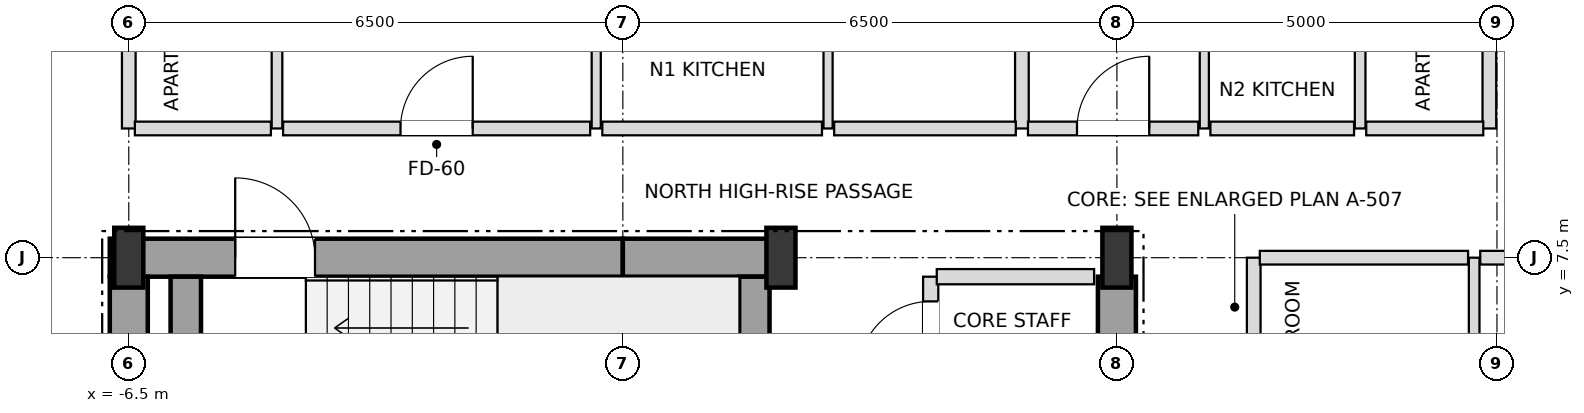
"""IFC4 building model, lengths in metres.
Left out: names, types, materials, properties, quantities, classifications, styles, units other than length and angle.
Written with IfcOpenShell. Run it as: python <this file> out.ifc"""

import sys

from ifc_helpers import new_model, si_unit, direction, frame, frame_2d, origin, origin_2d, place, context, subcontext, project, spatial, rectangle, i_section, extrude, element, fill, save


model = new_model("IFC4")
c1 = context("Model", 3, precision=1e-05, world=origin(), true_north=direction((0.0, 1.0)))
c2 = subcontext(c1, "Body", "Model", "MODEL_VIEW")
j1 = project(units=[si_unit("LENGTHUNIT", "METRE"), si_unit("PLANEANGLEUNIT", "RADIAN")], contexts=[c1])
p1 = place(None, origin())
s1 = spatial("IfcSite", under=j1, at=p1, CompositionType="ELEMENT")
p2 = place(p1, origin())
s2 = spatial("IfcBuilding", under=s1, at=p2, CompositionType="ELEMENT")
p3 = place(p2, frame((0.0, 0.0, 225.9)))
s3 = spatial("IfcBuildingStorey", under=s2, at=p3, CompositionType="ELEMENT", Elevation=225.9)
for number, where, z_axis, x_axis in (
    (1, (-6.5, 7.5, 0.0), (0.0, 0.0, 1.0), (1.0, 0.0, 0.0)),
    (2, (2.08, 7.5, 0.0), (0.0, 0.0, 1.0), (1.0, 0.0, 0.0)),
    (3, (6.5, 7.5, 0.0), (0.0, 0.0, 1.0), (1.0, 0.0, 0.0)),
):
    element("IfcColumn", number, at=place(p3, frame(where, z_axis=z_axis, x_axis=x_axis)), inside=s3, PredefinedType="COLUMN", context=c2, shape_type="SweptSolid", body=[
        extrude(i_section(OverallWidth=0.382, OverallDepth=0.786, WebThickness=0.02, FlangeThickness=0.033, at=origin_2d()), origin(), (0.0, 0.0, 1.0), 3.6),
    ])
p4 = place(p3, frame((-6.75, 7.5, 0.0), z_axis=(0.0, 0.0, 1.0), x_axis=(1.0, 0.0, 0.0)))
e4 = element("IfcWall", 4, at=p4, inside=s3, PredefinedType="SHEAR", context=c2, shape_type="SweptSolid", body=[
    extrude(rectangle(XDim=6.75, YDim=0.5, at=frame_2d((3.375, 0.0))), origin(), (0.0, 0.0, 1.0), 3.38),
])
p5 = place(p4, frame((1.65, 0.0, 0.0)))
e5 = element("IfcOpeningElement", 5, at=p5, cuts=e4, PredefinedType="OPENING", context=c2, shape_type="SweptSolid", body=[
    extrude(rectangle(XDim=1.05, YDim=2.15, at=frame_2d((0.525, 1.075))), frame((0.0, 0.26, 0.0), z_axis=(0.0, -1.0, 0.0), x_axis=(1.0, 0.0, 0.0)), (0.0, 0.0, 1.0), 0.52),
])
p6 = place(p3, frame((0.0, 7.5, 0.0), z_axis=(0.0, 0.0, 1.0), x_axis=(1.0, 0.0, 0.0)))
e6 = element("IfcWall", 6, at=p6, inside=s3, PredefinedType="SHEAR", context=c2, shape_type="SweptSolid", body=[
    extrude(rectangle(XDim=2.08, YDim=0.5, at=frame_2d((1.04, 0.0))), origin(), (0.0, 0.0, 1.0), 3.38),
])
for number, where, z_axis, x_axis in (
    (7, (-6.5, 3.95, 0.0), (0.0, 0.0, 1.0), (0.0, 1.0, 0.0)),
    (8, (6.5, 3.95, 0.0), (0.0, 0.0, 1.0), (0.0, 1.0, 0.0)),
):
    element("IfcWall", number, at=place(p3, frame(where, z_axis=z_axis, x_axis=x_axis)), inside=s3, PredefinedType="SHEAR", context=c2, shape_type="SweptSolid", body=[
        extrude(rectangle(XDim=3.3, YDim=0.5, at=frame_2d((1.65, 0.0))), origin(), (0.0, 0.0, 1.0), 3.38),
    ])
for number, where, z_axis, x_axis in (
    (9, (1.73, 3.95, 0.0), (0.0, 0.0, 1.0), (0.0, 1.0, 0.0)),
    (10, (-5.75, 3.95, 0.0), (0.0, 0.0, 1.0), (0.0, 1.0, 0.0)),
):
    element("IfcWall", number, at=place(p3, frame(where, z_axis=z_axis, x_axis=x_axis)), inside=s3, PredefinedType="SHEAR", context=c2, shape_type="SweptSolid", body=[
        extrude(rectangle(XDim=3.3, YDim=0.4, at=frame_2d((1.65, 0.0))), origin(), (0.0, 0.0, 1.0), 3.38),
    ])
p7 = place(p3, frame((-6.5, 9.2, 0.0), z_axis=(0.0, 0.0, 1.0), x_axis=(0.0, 1.0, 0.0)))
e11 = element("IfcWall", 11, at=p7, inside=s3, PredefinedType="PARTITIONING", context=c2, shape_type="SweptSolid", body=[
    extrude(rectangle(XDim=10.7, YDim=0.18, at=frame_2d((5.35, 0.0))), origin(), (0.0, 0.0, 1.0), 2.826),
])
p8 = place(p3, frame((-4.55, 9.2, 0.0), z_axis=(0.0, 0.0, 1.0), x_axis=(0.0, 1.0, 0.0)))
e12 = element("IfcWall", 12, at=p8, inside=s3, PredefinedType="PARTITIONING", context=c2, shape_type="SweptSolid", body=[
    extrude(rectangle(XDim=4.7, YDim=0.14, at=frame_2d((2.35, 0.0))), origin(), (0.0, 0.0, 1.0), 3.38),
])
p9 = place(p8, frame((1.9, 0.0, 0.0)))
e13 = element("IfcOpeningElement", 13, at=p9, cuts=e12, PredefinedType="OPENING", context=c2, shape_type="SweptSolid", body=[
    extrude(rectangle(XDim=0.9, YDim=2.1, at=frame_2d((0.45, 1.05))), frame((0.0, 0.08, 0.0), z_axis=(0.0, -1.0, 0.0), x_axis=(1.0, 0.0, 0.0)), (0.0, 0.0, 1.0), 0.16),
])
p10 = place(p3, frame((-0.35, 9.2, 0.0), z_axis=(0.0, 0.0, 1.0), x_axis=(0.0, 1.0, 0.0)))
e14 = element("IfcWall", 14, at=p10, inside=s3, PredefinedType="PARTITIONING", context=c2, shape_type="SweptSolid", body=[
    extrude(rectangle(XDim=4.7, YDim=0.12, at=frame_2d((2.35, 0.0))), origin(), (0.0, 0.0, 1.0), 3.38),
])
p11 = place(p10, frame((1.875, 0.0, 0.0)))
e15 = element("IfcOpeningElement", 15, at=p11, cuts=e14, PredefinedType="OPENING", context=c2, shape_type="SweptSolid", body=[
    extrude(rectangle(XDim=0.95, YDim=2.1, at=frame_2d((0.475, 1.05))), frame((0.0, 0.07, 0.0), z_axis=(0.0, -1.0, 0.0), x_axis=(1.0, 0.0, 0.0)), (0.0, 0.0, 1.0), 0.14),
])
p12 = place(p3, frame((2.7, 9.2, 0.0), z_axis=(0.0, 0.0, 1.0), x_axis=(0.0, 1.0, 0.0)))
e16 = element("IfcWall", 16, at=p12, inside=s3, PredefinedType="PARTITIONING", context=c2, shape_type="SweptSolid", body=[
    extrude(rectangle(XDim=4.7, YDim=0.12, at=frame_2d((2.35, 0.0))), origin(), (0.0, 0.0, 1.0), 3.38),
])
p13 = place(p12, frame((1.9, 0.0, 0.0)))
e17 = element("IfcOpeningElement", 17, at=p13, cuts=e16, PredefinedType="OPENING", context=c2, shape_type="SweptSolid", body=[
    extrude(rectangle(XDim=0.9, YDim=2.1, at=frame_2d((0.45, 1.05))), frame((0.0, 0.07, 0.0), z_axis=(0.0, -1.0, 0.0), x_axis=(1.0, 0.0, 0.0)), (0.0, 0.0, 1.0), 0.14),
])
p14 = place(p3, frame((4.05, 4.2, 0.0), z_axis=(0.0, 0.0, 1.0), x_axis=(0.0, 1.0, 0.0)))
e18 = element("IfcWall", 18, at=p14, inside=s3, PredefinedType="SOLIDWALL", context=c2, shape_type="SweptSolid", body=[
    extrude(rectangle(XDim=3.05, YDim=0.2, at=frame_2d((1.525, 0.0))), origin(), (0.0, 0.0, 1.0), 3.38),
])
p15 = place(p14, frame((0.275, 0.0, 0.0)))
e19 = element("IfcOpeningElement", 19, at=p15, cuts=e18, PredefinedType="OPENING", context=c2, shape_type="SweptSolid", body=[
    extrude(rectangle(XDim=0.95, YDim=2.15, at=frame_2d((0.475, 1.075))), frame((0.0, 0.11, 0.0), z_axis=(0.0, -1.0, 0.0), x_axis=(1.0, 0.0, 0.0)), (0.0, 0.0, 1.0), 0.22),
])
p16 = place(p14, frame((1.775, 0.0, 0.0)))
e20 = element("IfcOpeningElement", 20, at=p16, cuts=e18, PredefinedType="OPENING", context=c2, shape_type="SweptSolid", body=[
    extrude(rectangle(XDim=0.95, YDim=2.15, at=frame_2d((0.475, 1.075))), frame((0.0, 0.11, 0.0), z_axis=(0.0, -1.0, 0.0), x_axis=(1.0, 0.0, 0.0)), (0.0, 0.0, 1.0), 0.22),
])
p17 = place(p3, frame((5.25, 9.2, 0.0), z_axis=(0.0, 0.0, 1.0), x_axis=(0.0, 1.0, 0.0)))
e21 = element("IfcWall", 21, at=p17, inside=s3, PredefinedType="PARTITIONING", context=c2, shape_type="SweptSolid", body=[
    extrude(rectangle(XDim=10.7, YDim=0.18, at=frame_2d((5.35, 0.0))), origin(), (0.0, 0.0, 1.0), 3.018),
])
p18 = place(p3, frame((7.65, 9.2, 0.0), z_axis=(0.0, 0.0, 1.0), x_axis=(0.0, 1.0, 0.0)))
e22 = element("IfcWall", 22, at=p18, inside=s3, PredefinedType="PARTITIONING", context=c2, shape_type="SweptSolid", body=[
    extrude(rectangle(XDim=4.7, YDim=0.12, at=frame_2d((2.35, 0.0))), origin(), (0.0, 0.0, 1.0), 2.826),
])
p19 = place(p18, frame((1.875, 0.0, 0.0)))
e23 = element("IfcOpeningElement", 23, at=p19, cuts=e22, PredefinedType="OPENING", context=c2, shape_type="SweptSolid", body=[
    extrude(rectangle(XDim=0.95, YDim=2.1, at=frame_2d((0.475, 1.05))), frame((0.0, 0.07, 0.0), z_axis=(0.0, -1.0, 0.0), x_axis=(1.0, 0.0, 0.0)), (0.0, 0.0, 1.0), 0.14),
])
p20 = place(p3, frame((8.3, -7.5, 0.0), z_axis=(0.0, 0.0, 1.0), x_axis=(0.0, 1.0, 0.0)))
e24 = element("IfcWall", 24, at=p20, inside=s3, PredefinedType="PARTITIONING", context=c2, shape_type="SweptSolid", body=[
    extrude(rectangle(XDim=15.0, YDim=0.18, at=frame_2d((7.5, 0.0))), origin(), (0.0, 0.0, 1.0), 3.38),
])
p21 = place(p20, frame((2.355, 0.0, 0.0)))
e25 = element("IfcOpeningElement", 25, at=p21, cuts=e24, PredefinedType="OPENING", context=c2, shape_type="SweptSolid", body=[
    extrude(rectangle(XDim=0.95, YDim=2.15, at=frame_2d((0.475, 1.075))), frame((0.0, 0.1, 0.0), z_axis=(0.0, -1.0, 0.0), x_axis=(1.0, 0.0, 0.0)), (0.0, 0.0, 1.0), 0.2),
])
p22 = place(p3, frame((9.7, 9.2, 0.0), z_axis=(0.0, 0.0, 1.0), x_axis=(0.0, 1.0, 0.0)))
e26 = element("IfcWall", 26, at=p22, inside=s3, PredefinedType="PARTITIONING", context=c2, shape_type="SweptSolid", body=[
    extrude(rectangle(XDim=4.7, YDim=0.14, at=frame_2d((2.35, 0.0))), origin(), (0.0, 0.0, 1.0), 2.826),
])
p23 = place(p22, frame((1.9, 0.0, 0.0)))
e27 = element("IfcOpeningElement", 27, at=p23, cuts=e26, PredefinedType="OPENING", context=c2, shape_type="SweptSolid", body=[
    extrude(rectangle(XDim=0.9, YDim=2.1, at=frame_2d((0.45, 1.05))), frame((0.0, 0.08, 0.0), z_axis=(0.0, -1.0, 0.0), x_axis=(1.0, 0.0, 0.0)), (0.0, 0.0, 1.0), 0.16),
])
p24 = place(p3, frame((11.2, -7.5, 0.0), z_axis=(0.0, 0.0, 1.0), x_axis=(0.0, 1.0, 0.0)))
e28 = element("IfcWall", 28, at=p24, inside=s3, PredefinedType="PARTITIONING", context=c2, shape_type="SweptSolid", body=[
    extrude(rectangle(XDim=15.0, YDim=0.14, at=frame_2d((7.5, 0.0))), origin(), (0.0, 0.0, 1.0), 3.38),
])
p25 = place(p24, frame((3.475, 0.0, 0.0)))
e29 = element("IfcOpeningElement", 29, at=p25, cuts=e28, PredefinedType="OPENING", context=c2, shape_type="SweptSolid", body=[
    extrude(rectangle(XDim=0.95, YDim=2.1, at=frame_2d((0.475, 1.05))), frame((0.0, 0.08, 0.0), z_axis=(0.0, -1.0, 0.0), x_axis=(1.0, 0.0, 0.0)), (0.0, 0.0, 1.0), 0.16),
])
p26 = place(p3, frame((11.4, 9.2, 0.0), z_axis=(0.0, 0.0, 1.0), x_axis=(0.0, 1.0, 0.0)))
e30 = element("IfcWall", 30, at=p26, inside=s3, PredefinedType="PARTITIONING", context=c2, shape_type="SweptSolid", body=[
    extrude(rectangle(XDim=5.07, YDim=0.18, at=frame_2d((2.535, 0.0))), origin(), (0.0, 0.0, 1.0), 2.748),
])
p27 = place(p3, frame((4.13, 7.25, 0.0), z_axis=(0.0, 0.0, 1.0), x_axis=(1.0, 0.0, 0.0)))
e31 = element("IfcWall", 31, at=p27, inside=s3, PredefinedType="SOLIDWALL", context=c2, shape_type="SweptSolid", body=[
    extrude(rectangle(XDim=2.07, YDim=0.2, at=frame_2d((1.035, 0.0))), origin(), (0.0, 0.0, 1.0), 3.38),
])
p28 = place(p3, frame((8.38, 7.5, 0.0), z_axis=(0.0, 0.0, 1.0), x_axis=(1.0, 0.0, 0.0)))
e32 = element("IfcWall", 32, at=p28, inside=s3, PredefinedType="PARTITIONING", context=c2, shape_type="SweptSolid", body=[
    extrude(rectangle(XDim=2.74, YDim=0.18, at=frame_2d((1.37, 0.0))), origin(), (0.0, 0.0, 1.0), 2.826),
])
p29 = place(p3, frame((11.28, 7.5, 0.0), z_axis=(0.0, 0.0, 1.0), x_axis=(1.0, 0.0, 0.0)))
e33 = element("IfcWall", 33, at=p29, inside=s3, PredefinedType="PARTITIONING", context=c2, shape_type="SweptSolid", body=[
    extrude(rectangle(XDim=5.62, YDim=0.18, at=frame_2d((2.81, 0.0))), origin(), (0.0, 0.0, 1.0), 2.826),
])
p30 = place(p3, frame((-6.42, 9.2, 0.0), z_axis=(0.0, 0.0, 1.0), x_axis=(1.0, 0.0, 0.0)))
e34 = element("IfcWall", 34, at=p30, inside=s3, PredefinedType="PARTITIONING", context=c2, shape_type="SweptSolid", body=[
    extrude(rectangle(XDim=1.79, YDim=0.18, at=frame_2d((0.895, 0.0))), origin(), (0.0, 0.0, 1.0), 3.38),
])
p31 = place(p3, frame((-4.47, 9.2, 0.0), z_axis=(0.0, 0.0, 1.0), x_axis=(1.0, 0.0, 0.0)))
e35 = element("IfcWall", 35, at=p31, inside=s3, PredefinedType="PARTITIONING", context=c2, shape_type="SweptSolid", body=[
    extrude(rectangle(XDim=4.04, YDim=0.18, at=frame_2d((2.02, 0.0))), origin(), (0.0, 0.0, 1.0), 3.38),
])
p32 = place(p31, frame((1.545, 0.0, 0.0)))
e36 = element("IfcOpeningElement", 36, at=p32, cuts=e35, PredefinedType="OPENING", context=c2, shape_type="SweptSolid", body=[
    extrude(rectangle(XDim=0.95, YDim=2.15, at=frame_2d((0.475, 1.075))), frame((0.0, 0.1, 0.0), z_axis=(0.0, -1.0, 0.0), x_axis=(1.0, 0.0, 0.0)), (0.0, 0.0, 1.0), 0.2),
])
p33 = place(p3, frame((-0.27, 9.2, 0.0), z_axis=(0.0, 0.0, 1.0), x_axis=(1.0, 0.0, 0.0)))
e37 = element("IfcWall", 37, at=p33, inside=s3, PredefinedType="PARTITIONING", context=c2, shape_type="SweptSolid", body=[
    extrude(rectangle(XDim=2.89, YDim=0.18, at=frame_2d((1.445, 0.0))), origin(), (0.0, 0.0, 1.0), 3.38),
])
p34 = place(p3, frame((2.78, 9.2, 0.0), z_axis=(0.0, 0.0, 1.0), x_axis=(1.0, 0.0, 0.0)))
e38 = element("IfcWall", 38, at=p34, inside=s3, PredefinedType="PARTITIONING", context=c2, shape_type="SweptSolid", body=[
    extrude(rectangle(XDim=2.39, YDim=0.18, at=frame_2d((1.195, 0.0))), origin(), (0.0, 0.0, 1.0), 3.38),
])
p35 = place(p3, frame((5.33, 9.2, 0.0), z_axis=(0.0, 0.0, 1.0), x_axis=(1.0, 0.0, 0.0)))
e39 = element("IfcWall", 39, at=p35, inside=s3, PredefinedType="PARTITIONING", context=c2, shape_type="SweptSolid", body=[
    extrude(rectangle(XDim=2.24, YDim=0.18, at=frame_2d((1.12, 0.0))), origin(), (0.0, 0.0, 1.0), 2.826),
])
p36 = place(p35, frame((0.645, 0.0, 0.0)))
e40 = element("IfcOpeningElement", 40, at=p36, cuts=e39, PredefinedType="OPENING", context=c2, shape_type="SweptSolid", body=[
    extrude(rectangle(XDim=0.95, YDim=2.15, at=frame_2d((0.475, 1.075))), frame((0.0, 0.1, 0.0), z_axis=(0.0, -1.0, 0.0), x_axis=(1.0, 0.0, 0.0)), (0.0, 0.0, 1.0), 0.2),
])
p37 = place(p3, frame((7.73, 9.2, 0.0), z_axis=(0.0, 0.0, 1.0), x_axis=(1.0, 0.0, 0.0)))
e41 = element("IfcWall", 41, at=p37, inside=s3, PredefinedType="PARTITIONING", context=c2, shape_type="SweptSolid", body=[
    extrude(rectangle(XDim=1.89, YDim=0.18, at=frame_2d((0.945, 0.0))), origin(), (0.0, 0.0, 1.0), 3.38),
])
p38 = place(p3, frame((9.78, 9.2, 0.0), z_axis=(0.0, 0.0, 1.0), x_axis=(1.0, 0.0, 0.0)))
e42 = element("IfcWall", 42, at=p38, inside=s3, PredefinedType="PARTITIONING", context=c2, shape_type="SweptSolid", body=[
    extrude(rectangle(XDim=1.54, YDim=0.18, at=frame_2d((0.77, 0.0))), origin(), (0.0, 0.0, 1.0), 3.38),
])
p39 = place(p5, origin())
e43 = element("IfcDoor", 43, at=p39, inside=s3, OperationType="SINGLE_SWING_LEFT", PredefinedType="DOOR", context=c2, shape_type="SweptSolid", body=[
    extrude(rectangle(XDim=1.05, YDim=2.15, at=frame_2d((0.525, 1.075))), frame((0.0, 0.025, 0.0), z_axis=(0.0, -1.0, 0.0), x_axis=(1.0, 0.0, 0.0)), (0.0, 0.0, 1.0), 0.05),
])
fill(e5, e43)
p40 = place(p16, origin())
e44 = element("IfcDoor", 44, at=p40, inside=s3, OperationType="SINGLE_SWING_LEFT", PredefinedType="DOOR", context=c2, shape_type="SweptSolid", body=[
    extrude(rectangle(XDim=0.95, YDim=2.15, at=frame_2d((0.475, 1.075))), frame((0.0, 0.025, 0.0), z_axis=(0.0, -1.0, 0.0), x_axis=(1.0, 0.0, 0.0)), (0.0, 0.0, 1.0), 0.05),
])
fill(e20, e44)
p41 = place(p32, origin())
e45 = element("IfcDoor", 45, at=p41, inside=s3, OperationType="SINGLE_SWING_RIGHT", PredefinedType="DOOR", context=c2, shape_type="SweptSolid", body=[
    extrude(rectangle(XDim=0.95, YDim=2.15, at=frame_2d((0.475, 1.075))), frame((0.0, 0.025, 0.0), z_axis=(0.0, -1.0, 0.0), x_axis=(1.0, 0.0, 0.0)), (0.0, 0.0, 1.0), 0.05),
])
fill(e36, e45)
p42 = place(p36, origin())
e46 = element("IfcDoor", 46, at=p42, inside=s3, OperationType="SINGLE_SWING_RIGHT", PredefinedType="DOOR", context=c2, shape_type="SweptSolid", body=[
    extrude(rectangle(XDim=0.95, YDim=2.15, at=frame_2d((0.475, 1.075))), frame((0.0, 0.025, 0.0), z_axis=(0.0, -1.0, 0.0), x_axis=(1.0, 0.0, 0.0)), (0.0, 0.0, 1.0), 0.05),
])
fill(e40, e46)
save(model, sys.argv[1])
